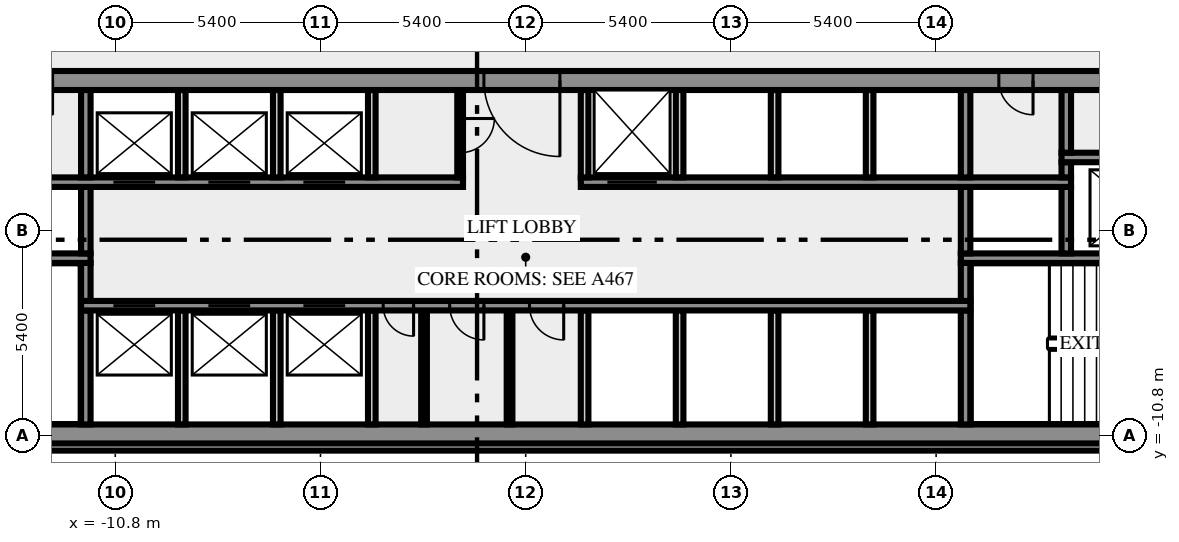
"""IFC4 building model, lengths in metres.
Left out: names, types, materials, properties, quantities, classifications, styles, units other than length and angle.
Written with IfcOpenShell. Run it as: python <this file> out.ifc"""

import sys

from ifc_helpers import new_model, si_unit, direction, frame, frame_2d, origin, place, context, subcontext, project, spatial, rectangle, extrude, element, fill, save


model = new_model("IFC4")
c1 = context("Model", 3, precision=1e-05, world=origin(), true_north=direction((0.0, 1.0)))
c2 = subcontext(c1, "Body", "Model", "MODEL_VIEW")
j1 = project(units=[si_unit("LENGTHUNIT", "METRE"), si_unit("PLANEANGLEUNIT", "RADIAN")], contexts=[c1])
p1 = place(None, origin())
s1 = spatial("IfcSite", under=j1, at=p1, CompositionType="ELEMENT")
p2 = place(p1, origin())
s2 = spatial("IfcBuilding", under=s1, at=p2, CompositionType="ELEMENT")
p3 = place(p2, frame((0.0, 0.0, 97.0)))
s3 = spatial("IfcBuildingStorey", under=s2, at=p3, CompositionType="ELEMENT", Elevation=97.0)
p4 = place(p3, frame((-17.444, -11.088, 0.0), z_axis=(0.0, 0.0, 1.0), x_axis=(1.0, 0.0, 0.0)))
e1 = element("IfcWall", 1, at=p4, inside=s3, PredefinedType="SOLIDWALL", context=c2, shape_type="SweptSolid", body=[
    extrude(rectangle(XDim=34.888, YDim=0.2, at=frame_2d((17.444, 0.0))), origin(), (0.0, 0.0, 1.0), 3.65),
])
p5 = place(p3, frame((-20.0, -10.75, 0.0), z_axis=(0.0, 0.0, 1.0), x_axis=(1.0, 0.0, 0.0)))
e2 = element("IfcWall", 2, at=p5, inside=s3, PredefinedType="SHEAR", context=c2, shape_type="SweptSolid", body=[
    extrude(rectangle(XDim=40.0, YDim=0.5, at=frame_2d((20.0, 0.0))), origin(), (0.0, 0.0, 1.0), 3.65),
])
p6 = place(p5, frame((0.8, 0.0, 1.0)))
e3 = element("IfcOpeningElement", 3, at=p6, cuts=e2, PredefinedType="OPENING", context=c2, shape_type="SweptSolid", body=[
    extrude(rectangle(XDim=1.2, YDim=1.2, at=frame_2d((0.6, 0.6))), frame((0.0, 0.26, 0.0), z_axis=(0.0, -1.0, 0.0), x_axis=(1.0, 0.0, 0.0)), (0.0, 0.0, 1.0), 0.52),
])
p7 = place(p5, frame((38.0, 0.0, 1.0)))
e4 = element("IfcOpeningElement", 4, at=p7, cuts=e2, PredefinedType="OPENING", context=c2, shape_type="SweptSolid", body=[
    extrude(rectangle(XDim=1.2, YDim=1.2, at=frame_2d((0.6, 0.6))), frame((0.0, 0.26, 0.0), z_axis=(0.0, -1.0, 0.0), x_axis=(1.0, 0.0, 0.0)), (0.0, 0.0, 1.0), 0.52),
])
p8 = place(p3, frame((-11.575, -10.5, 0.0), z_axis=(0.0, 0.0, 1.0), x_axis=(0.0, 1.0, 0.0)))
e5 = element("IfcWall", 5, at=p8, inside=s3, PredefinedType="SHEAR", context=c2, shape_type="SweptSolid", body=[
    extrude(rectangle(XDim=3.0, YDim=0.25, at=frame_2d((1.5, 0.0))), origin(), (0.0, 0.0, 1.0), 3.65),
])
for number, where, z_axis, x_axis in (
    (6, (-9.05, -10.5, 0.0), (0.0, 0.0, 1.0), (0.0, 1.0, 0.0)),
    (7, (-6.55, -10.5, 0.0), (0.0, 0.0, 1.0), (0.0, 1.0, 0.0)),
    (8, (-4.05, -10.5, 0.0), (0.0, 0.0, 1.0), (0.0, 1.0, 0.0)),
):
    element("IfcWall", number, at=place(p3, frame(where, z_axis=z_axis, x_axis=x_axis)), inside=s3, PredefinedType="SOLIDWALL", context=c2, shape_type="SweptSolid", body=[
        extrude(rectangle(XDim=3.0, YDim=0.2, at=frame_2d((1.5, 0.0))), origin(), (0.0, 0.0, 1.0), 3.65),
    ])
for number, where, z_axis, x_axis in (
    (9, (-2.675, -10.5, 0.0), (0.0, 0.0, 1.0), (0.0, 1.0, 0.0)),
    (10, (-0.425, -10.5, 0.0), (0.0, 0.0, 1.0), (0.0, 1.0, 0.0)),
):
    element("IfcWall", number, at=place(p3, frame(where, z_axis=z_axis, x_axis=x_axis)), inside=s3, PredefinedType="PARTITIONING", context=c2, shape_type="SweptSolid", body=[
        extrude(rectangle(XDim=3.0, YDim=0.15, at=frame_2d((1.5, 0.0))), origin(), (0.0, 0.0, 1.0), 3.65),
    ])
for number, where, z_axis, x_axis in (
    (11, (1.55, -10.5, 0.0), (0.0, 0.0, 1.0), (0.0, 1.0, 0.0)),
    (12, (4.05, -10.5, 0.0), (0.0, 0.0, 1.0), (0.0, 1.0, 0.0)),
    (13, (6.55, -10.5, 0.0), (0.0, 0.0, 1.0), (0.0, 1.0, 0.0)),
    (14, (9.05, -10.5, 0.0), (0.0, 0.0, 1.0), (0.0, 1.0, 0.0)),
):
    element("IfcWall", number, at=place(p3, frame(where, z_axis=z_axis, x_axis=x_axis)), inside=s3, PredefinedType="SOLIDWALL", context=c2, shape_type="SweptSolid", body=[
        extrude(rectangle(XDim=3.0, YDim=0.2, at=frame_2d((1.5, 0.0))), origin(), (0.0, 0.0, 1.0), 3.65),
    ])
p9 = place(p3, frame((11.575, -10.5, 0.0), z_axis=(0.0, 0.0, 1.0), x_axis=(0.0, 1.0, 0.0)))
e15 = element("IfcWall", 15, at=p9, inside=s3, PredefinedType="SHEAR", context=c2, shape_type="SweptSolid", body=[
    extrude(rectangle(XDim=3.0, YDim=0.25, at=frame_2d((1.5, 0.0))), origin(), (0.0, 0.0, 1.0), 3.65),
])
p10 = place(p3, frame((11.7, -7.375, 0.0), z_axis=(0.0, 0.0, 1.0), x_axis=(-1.0, 0.0, 0.0)))
e16 = element("IfcWall", 16, at=p10, inside=s3, PredefinedType="SHEAR", context=c2, shape_type="SweptSolid", body=[
    extrude(rectangle(XDim=23.4, YDim=0.25, at=frame_2d((11.7, 0.0))), origin(), (0.0, 0.0, 1.0), 3.65),
])
p11 = place(p10, frame((21.45, 0.0, 0.0)))
e17 = element("IfcOpeningElement", 17, at=p11, cuts=e16, PredefinedType="OPENING", context=c2, shape_type="SweptSolid", body=[
    extrude(rectangle(XDim=1.1, YDim=2.1, at=frame_2d((0.55, 1.05))), frame((0.0, 0.135, 0.0), z_axis=(0.0, -1.0, 0.0), x_axis=(1.0, 0.0, 0.0)), (0.0, 0.0, 1.0), 0.27),
])
p12 = place(p10, frame((18.95, 0.0, 0.0)))
e18 = element("IfcOpeningElement", 18, at=p12, cuts=e16, PredefinedType="OPENING", context=c2, shape_type="SweptSolid", body=[
    extrude(rectangle(XDim=1.1, YDim=2.1, at=frame_2d((0.55, 1.05))), frame((0.0, 0.135, 0.0), z_axis=(0.0, -1.0, 0.0), x_axis=(1.0, 0.0, 0.0)), (0.0, 0.0, 1.0), 0.27),
])
p13 = place(p10, frame((16.45, 0.0, 0.0)))
e19 = element("IfcOpeningElement", 19, at=p13, cuts=e16, PredefinedType="OPENING", context=c2, shape_type="SweptSolid", body=[
    extrude(rectangle(XDim=1.1, YDim=2.1, at=frame_2d((0.55, 1.05))), frame((0.0, 0.135, 0.0), z_axis=(0.0, -1.0, 0.0), x_axis=(1.0, 0.0, 0.0)), (0.0, 0.0, 1.0), 0.27),
])
p14 = place(p10, frame((14.65, 0.0, 0.0)))
e20 = element("IfcOpeningElement", 20, at=p14, cuts=e16, PredefinedType="OPENING", context=c2, shape_type="SweptSolid", body=[
    extrude(rectangle(XDim=0.8, YDim=2.1, at=frame_2d((0.4, 1.05))), frame((0.0, 0.135, 0.0), z_axis=(0.0, -1.0, 0.0), x_axis=(1.0, 0.0, 0.0)), (0.0, 0.0, 1.0), 0.27),
])
p15 = place(p10, frame((12.8, 0.0, 0.0)))
e21 = element("IfcOpeningElement", 21, at=p15, cuts=e16, PredefinedType="OPENING", context=c2, shape_type="SweptSolid", body=[
    extrude(rectangle(XDim=0.9, YDim=2.1, at=frame_2d((0.45, 1.05))), frame((0.0, 0.135, 0.0), z_axis=(0.0, -1.0, 0.0), x_axis=(1.0, 0.0, 0.0)), (0.0, 0.0, 1.0), 0.27),
])
p16 = place(p10, frame((10.7, 0.0, 0.0)))
e22 = element("IfcOpeningElement", 22, at=p16, cuts=e16, PredefinedType="OPENING", context=c2, shape_type="SweptSolid", body=[
    extrude(rectangle(XDim=0.9, YDim=2.1, at=frame_2d((0.45, 1.05))), frame((0.0, 0.135, 0.0), z_axis=(0.0, -1.0, 0.0), x_axis=(1.0, 0.0, 0.0)), (0.0, 0.0, 1.0), 0.27),
])
for number, where, z_axis, x_axis in (
    (23, (-11.575, -7.25, 0.0), (0.0, 0.0, 1.0), (0.0, 1.0, 0.0)),
    (24, (11.575, -7.25, 0.0), (0.0, 0.0, 1.0), (0.0, 1.0, 0.0)),
):
    element("IfcWall", number, at=place(p3, frame(where, z_axis=z_axis, x_axis=x_axis)), inside=s3, PredefinedType="SHEAR", context=c2, shape_type="SweptSolid", body=[
        extrude(rectangle(XDim=1.0, YDim=0.25, at=frame_2d((0.5, 0.0))), origin(), (0.0, 0.0, 1.0), 3.65),
    ])
p17 = place(p3, frame((-11.45, -6.125, 0.0), z_axis=(0.0, 0.0, 1.0), x_axis=(-1.0, 0.0, 0.0)))
e25 = element("IfcWall", 25, at=p17, inside=s3, PredefinedType="SHEAR", context=c2, shape_type="SweptSolid", body=[
    extrude(rectangle(XDim=8.05, YDim=0.25, at=frame_2d((4.025, 0.0))), origin(), (0.0, 0.0, 1.0), 3.65),
])
p18 = place(p17, frame((6.2, 0.0, 0.0)))
e26 = element("IfcOpeningElement", 26, at=p18, cuts=e25, PredefinedType="OPENING", context=c2, shape_type="SweptSolid", body=[
    extrude(rectangle(XDim=1.8, YDim=2.1, at=frame_2d((0.9, 1.05))), frame((0.0, 0.135, 0.0), z_axis=(0.0, -1.0, 0.0), x_axis=(1.0, 0.0, 0.0)), (0.0, 0.0, 1.0), 0.27),
])
p19 = place(p3, frame((19.5, -6.125, 0.0), z_axis=(0.0, 0.0, 1.0), x_axis=(-1.0, 0.0, 0.0)))
e27 = element("IfcWall", 27, at=p19, inside=s3, PredefinedType="SHEAR", context=c2, shape_type="SweptSolid", body=[
    extrude(rectangle(XDim=8.05, YDim=0.25, at=frame_2d((4.025, 0.0))), origin(), (0.0, 0.0, 1.0), 3.65),
])
p20 = place(p19, frame((0.05, 0.0, 0.0)))
e28 = element("IfcOpeningElement", 28, at=p20, cuts=e27, PredefinedType="OPENING", context=c2, shape_type="SweptSolid", body=[
    extrude(rectangle(XDim=1.8, YDim=2.1, at=frame_2d((0.9, 1.05))), frame((0.0, 0.135, 0.0), z_axis=(0.0, -1.0, 0.0), x_axis=(1.0, 0.0, 0.0)), (0.0, 0.0, 1.0), 0.27),
])
for number, where, z_axis, x_axis in (
    (29, (-11.575, -6.0, 0.0), (0.0, 0.0, 1.0), (0.0, 1.0, 0.0)),
    (30, (11.575, -6.0, 0.0), (0.0, 0.0, 1.0), (0.0, 1.0, 0.0)),
    (31, (14.225, -6.0, 0.0), (0.0, 0.0, 1.0), (0.0, 1.0, 0.0)),
):
    element("IfcWall", number, at=place(p3, frame(where, z_axis=z_axis, x_axis=x_axis)), inside=s3, PredefinedType="SHEAR", context=c2, shape_type="SweptSolid", body=[
        extrude(rectangle(XDim=1.75, YDim=0.25, at=frame_2d((0.875, 0.0))), origin(), (0.0, 0.0, 1.0), 3.65),
    ])
p21 = place(p3, frame((-14.35, -4.125, 0.0), z_axis=(0.0, 0.0, 1.0), x_axis=(1.0, 0.0, 0.0)))
e32 = element("IfcWall", 32, at=p21, inside=s3, PredefinedType="SHEAR", context=c2, shape_type="SweptSolid", body=[
    extrude(rectangle(XDim=12.7, YDim=0.25, at=frame_2d((6.35, 0.0))), origin(), (0.0, 0.0, 1.0), 3.65),
])
p22 = place(p21, frame((3.5, 0.0, 0.0)))
e33 = element("IfcOpeningElement", 33, at=p22, cuts=e32, PredefinedType="OPENING", context=c2, shape_type="SweptSolid", body=[
    extrude(rectangle(XDim=1.1, YDim=2.1, at=frame_2d((0.55, 1.05))), frame((0.0, 0.135, 0.0), z_axis=(0.0, -1.0, 0.0), x_axis=(1.0, 0.0, 0.0)), (0.0, 0.0, 1.0), 0.27),
])
p23 = place(p21, frame((6.0, 0.0, 0.0)))
e34 = element("IfcOpeningElement", 34, at=p23, cuts=e32, PredefinedType="OPENING", context=c2, shape_type="SweptSolid", body=[
    extrude(rectangle(XDim=1.1, YDim=2.1, at=frame_2d((0.55, 1.05))), frame((0.0, 0.135, 0.0), z_axis=(0.0, -1.0, 0.0), x_axis=(1.0, 0.0, 0.0)), (0.0, 0.0, 1.0), 0.27),
])
p24 = place(p21, frame((8.5, 0.0, 0.0)))
e35 = element("IfcOpeningElement", 35, at=p24, cuts=e32, PredefinedType="OPENING", context=c2, shape_type="SweptSolid", body=[
    extrude(rectangle(XDim=1.1, YDim=2.1, at=frame_2d((0.55, 1.05))), frame((0.0, 0.135, 0.0), z_axis=(0.0, -1.0, 0.0), x_axis=(1.0, 0.0, 0.0)), (0.0, 0.0, 1.0), 0.27),
])
p25 = place(p3, frame((1.45, -4.125, 0.0), z_axis=(0.0, 0.0, 1.0), x_axis=(1.0, 0.0, 0.0)))
e36 = element("IfcWall", 36, at=p25, inside=s3, PredefinedType="SHEAR", context=c2, shape_type="SweptSolid", body=[
    extrude(rectangle(XDim=12.9, YDim=0.25, at=frame_2d((6.45, 0.0))), origin(), (0.0, 0.0, 1.0), 3.65),
])
p26 = place(p25, frame((0.7, 0.0, 0.0)))
e37 = element("IfcOpeningElement", 37, at=p26, cuts=e36, PredefinedType="OPENING", context=c2, shape_type="SweptSolid", body=[
    extrude(rectangle(XDim=1.3, YDim=2.1, at=frame_2d((0.65, 1.05))), frame((0.0, 0.135, 0.0), z_axis=(0.0, -1.0, 0.0), x_axis=(1.0, 0.0, 0.0)), (0.0, 0.0, 1.0), 0.27),
])
p27 = place(p3, frame((-11.575, -4.0, 0.0), z_axis=(0.0, 0.0, 1.0), x_axis=(0.0, 1.0, 0.0)))
e38 = element("IfcWall", 38, at=p27, inside=s3, PredefinedType="SHEAR", context=c2, shape_type="SweptSolid", body=[
    extrude(rectangle(XDim=2.3, YDim=0.25, at=frame_2d((1.15, 0.0))), origin(), (0.0, 0.0, 1.0), 3.65),
])
for number, where, z_axis, x_axis in (
    (39, (-9.05, -4.0, 0.0), (0.0, 0.0, 1.0), (0.0, 1.0, 0.0)),
    (40, (-6.55, -4.0, 0.0), (0.0, 0.0, 1.0), (0.0, 1.0, 0.0)),
    (41, (-4.05, -4.0, 0.0), (0.0, 0.0, 1.0), (0.0, 1.0, 0.0)),
):
    element("IfcWall", number, at=place(p3, frame(where, z_axis=z_axis, x_axis=x_axis)), inside=s3, PredefinedType="SOLIDWALL", context=c2, shape_type="SweptSolid", body=[
        extrude(rectangle(XDim=2.3, YDim=0.2, at=frame_2d((1.15, 0.0))), origin(), (0.0, 0.0, 1.0), 3.65),
    ])
p28 = place(p3, frame((-1.725, -1.7, 0.0), z_axis=(0.0, 0.0, 1.0), x_axis=(0.0, -1.0, 0.0)))
e42 = element("IfcWall", 42, at=p28, inside=s3, PredefinedType="PARTITIONING", context=c2, shape_type="SweptSolid", body=[
    extrude(rectangle(XDim=2.3, YDim=0.15, at=frame_2d((1.15, 0.0))), origin(), (0.0, 0.0, 1.0), 3.65),
])
p29 = place(p28, frame((0.75, 0.0, 0.0)))
e43 = element("IfcOpeningElement", 43, at=p29, cuts=e42, PredefinedType="OPENING", context=c2, shape_type="SweptSolid", body=[
    extrude(rectangle(XDim=0.9, YDim=2.1, at=frame_2d((0.45, 1.05))), frame((0.0, 0.085, 0.0), z_axis=(0.0, -1.0, 0.0), x_axis=(1.0, 0.0, 0.0)), (0.0, 0.0, 1.0), 0.17),
])
for number, where, z_axis, x_axis in (
    (44, (1.55, -4.0, 0.0), (0.0, 0.0, 1.0), (0.0, 1.0, 0.0)),
    (45, (4.05, -4.0, 0.0), (0.0, 0.0, 1.0), (0.0, 1.0, 0.0)),
    (46, (6.55, -4.0, 0.0), (0.0, 0.0, 1.0), (0.0, 1.0, 0.0)),
    (47, (9.05, -4.0, 0.0), (0.0, 0.0, 1.0), (0.0, 1.0, 0.0)),
):
    element("IfcWall", number, at=place(p3, frame(where, z_axis=z_axis, x_axis=x_axis)), inside=s3, PredefinedType="SOLIDWALL", context=c2, shape_type="SweptSolid", body=[
        extrude(rectangle(XDim=2.3, YDim=0.2, at=frame_2d((1.15, 0.0))), origin(), (0.0, 0.0, 1.0), 3.65),
    ])
p30 = place(p3, frame((11.575, -4.0, 0.0), z_axis=(0.0, 0.0, 1.0), x_axis=(0.0, 1.0, 0.0)))
e48 = element("IfcWall", 48, at=p30, inside=s3, PredefinedType="SHEAR", context=c2, shape_type="SweptSolid", body=[
    extrude(rectangle(XDim=2.3, YDim=0.25, at=frame_2d((1.15, 0.0))), origin(), (0.0, 0.0, 1.0), 3.65),
])
p31 = place(p3, frame((14.225, -4.0, 0.0), z_axis=(0.0, 0.0, 1.0), x_axis=(0.0, 1.0, 0.0)))
e49 = element("IfcWall", 49, at=p31, inside=s3, PredefinedType="SHEAR", context=c2, shape_type="SweptSolid", body=[
    extrude(rectangle(XDim=0.4, YDim=0.25, at=frame_2d((0.2, 0.0))), origin(), (0.0, 0.0, 1.0), 3.65),
])
p32 = place(p3, frame((14.1, -3.475, 0.0), z_axis=(0.0, 0.0, 1.0), x_axis=(1.0, 0.0, 0.0)))
e50 = element("IfcWall", 50, at=p32, inside=s3, PredefinedType="SHEAR", context=c2, shape_type="SweptSolid", body=[
    extrude(rectangle(XDim=3.25, YDim=0.25, at=frame_2d((1.625, 0.0))), origin(), (0.0, 0.0, 1.0), 3.65),
])
p33 = place(p3, frame((14.225, -3.35, 0.0), z_axis=(0.0, 0.0, 1.0), x_axis=(0.0, 1.0, 0.0)))
e51 = element("IfcWall", 51, at=p33, inside=s3, PredefinedType="SHEAR", context=c2, shape_type="SweptSolid", body=[
    extrude(rectangle(XDim=1.65, YDim=0.25, at=frame_2d((0.825, 0.0))), origin(), (0.0, 0.0, 1.0), 3.65),
])
p34 = place(p3, frame((20.49, -1.45, 0.0), z_axis=(0.0, 0.0, 1.0), x_axis=(-1.0, 0.0, 0.0)))
e52 = element("IfcWall", 52, at=p34, inside=s3, PredefinedType="SHEAR", context=c2, shape_type="SweptSolid", body=[
    extrude(rectangle(XDim=40.98, YDim=0.5, at=frame_2d((20.49, 0.0))), origin(), (0.0, 0.0, 1.0), 3.65),
])
p35 = place(p34, frame((38.14, 0.0, 0.0)))
e53 = element("IfcOpeningElement", 53, at=p35, cuts=e52, PredefinedType="OPENING", context=c2, shape_type="SweptSolid", body=[
    extrude(rectangle(XDim=1.8, YDim=2.1, at=frame_2d((0.9, 1.05))), frame((0.0, 0.26, 0.0), z_axis=(0.0, -1.0, 0.0), x_axis=(1.0, 0.0, 0.0)), (0.0, 0.0, 1.0), 0.52),
])
p36 = place(p34, frame((36.728, 0.0, 0.0)))
e54 = element("IfcOpeningElement", 54, at=p36, cuts=e52, PredefinedType="OPENING", context=c2, shape_type="SweptSolid", body=[
    extrude(rectangle(XDim=0.8, YDim=2.1, at=frame_2d((0.4, 1.05))), frame((0.0, 0.26, 0.0), z_axis=(0.0, -1.0, 0.0), x_axis=(1.0, 0.0, 0.0)), (0.0, 0.0, 1.0), 0.52),
])
p37 = place(p34, frame((35.153, 0.0, 0.0)))
e55 = element("IfcOpeningElement", 55, at=p37, cuts=e52, PredefinedType="OPENING", context=c2, shape_type="SweptSolid", body=[
    extrude(rectangle(XDim=0.8, YDim=2.1, at=frame_2d((0.4, 1.05))), frame((0.0, 0.26, 0.0), z_axis=(0.0, -1.0, 0.0), x_axis=(1.0, 0.0, 0.0)), (0.0, 0.0, 1.0), 0.52),
])
p38 = place(p34, frame((32.94, 0.0, 0.0)))
e56 = element("IfcOpeningElement", 56, at=p38, cuts=e52, PredefinedType="OPENING", context=c2, shape_type="SweptSolid", body=[
    extrude(rectangle(XDim=0.9, YDim=2.1, at=frame_2d((0.45, 1.05))), frame((0.0, 0.26, 0.0), z_axis=(0.0, -1.0, 0.0), x_axis=(1.0, 0.0, 0.0)), (0.0, 0.0, 1.0), 0.52),
])
p39 = place(p34, frame((19.59, 0.0, 0.0)))
e57 = element("IfcOpeningElement", 57, at=p39, cuts=e52, PredefinedType="OPENING", context=c2, shape_type="SweptSolid", body=[
    extrude(rectangle(XDim=2.0, YDim=2.1, at=frame_2d((1.0, 1.05))), frame((0.0, 0.26, 0.0), z_axis=(0.0, -1.0, 0.0), x_axis=(1.0, 0.0, 0.0)), (0.0, 0.0, 1.0), 0.52),
])
p40 = place(p34, frame((7.14, 0.0, 0.0)))
e58 = element("IfcOpeningElement", 58, at=p40, cuts=e52, PredefinedType="OPENING", context=c2, shape_type="SweptSolid", body=[
    extrude(rectangle(XDim=0.9, YDim=2.1, at=frame_2d((0.45, 1.05))), frame((0.0, 0.26, 0.0), z_axis=(0.0, -1.0, 0.0), x_axis=(1.0, 0.0, 0.0)), (0.0, 0.0, 1.0), 0.52),
])
p41 = place(p34, frame((4.19, 0.0, 0.0)))
e59 = element("IfcOpeningElement", 59, at=p41, cuts=e52, PredefinedType="OPENING", context=c2, shape_type="SweptSolid", body=[
    extrude(rectangle(XDim=0.9, YDim=2.1, at=frame_2d((0.45, 1.05))), frame((0.0, 0.26, 0.0), z_axis=(0.0, -1.0, 0.0), x_axis=(1.0, 0.0, 0.0)), (0.0, 0.0, 1.0), 0.52),
])
p42 = place(p34, frame((1.04, 0.0, 0.0)))
e60 = element("IfcOpeningElement", 60, at=p42, cuts=e52, PredefinedType="OPENING", context=c2, shape_type="SweptSolid", body=[
    extrude(rectangle(XDim=1.8, YDim=2.1, at=frame_2d((0.9, 1.05))), frame((0.0, 0.26, 0.0), z_axis=(0.0, -1.0, 0.0), x_axis=(1.0, 0.0, 0.0)), (0.0, 0.0, 1.0), 0.52),
])
p43 = place(p11, origin())
e61 = element("IfcDoor", 61, at=p43, inside=s3, OperationType="DOUBLE_DOOR_SLIDING", PredefinedType="DOOR", context=c2, shape_type="SweptSolid", body=[
    extrude(rectangle(XDim=1.1, YDim=2.1, at=frame_2d((0.55, 1.05))), frame((0.0, 0.025, 0.0), z_axis=(0.0, -1.0, 0.0), x_axis=(1.0, 0.0, 0.0)), (0.0, 0.0, 1.0), 0.05),
])
fill(e17, e61)
p44 = place(p12, origin())
e62 = element("IfcDoor", 62, at=p44, inside=s3, OperationType="DOUBLE_DOOR_SLIDING", PredefinedType="DOOR", context=c2, shape_type="SweptSolid", body=[
    extrude(rectangle(XDim=1.1, YDim=2.1, at=frame_2d((0.55, 1.05))), frame((0.0, 0.025, 0.0), z_axis=(0.0, -1.0, 0.0), x_axis=(1.0, 0.0, 0.0)), (0.0, 0.0, 1.0), 0.05),
])
fill(e18, e62)
p45 = place(p13, origin())
e63 = element("IfcDoor", 63, at=p45, inside=s3, OperationType="DOUBLE_DOOR_SLIDING", PredefinedType="DOOR", context=c2, shape_type="SweptSolid", body=[
    extrude(rectangle(XDim=1.1, YDim=2.1, at=frame_2d((0.55, 1.05))), frame((0.0, 0.025, 0.0), z_axis=(0.0, -1.0, 0.0), x_axis=(1.0, 0.0, 0.0)), (0.0, 0.0, 1.0), 0.05),
])
fill(e19, e63)
p46 = place(p14, origin())
e64 = element("IfcDoor", 64, at=p46, inside=s3, OperationType="SINGLE_SWING_RIGHT", PredefinedType="DOOR", context=c2, shape_type="SweptSolid", body=[
    extrude(rectangle(XDim=0.8, YDim=2.1, at=frame_2d((0.4, 1.05))), frame((0.0, 0.025, 0.0), z_axis=(0.0, -1.0, 0.0), x_axis=(1.0, 0.0, 0.0)), (0.0, 0.0, 1.0), 0.05),
])
fill(e20, e64)
p47 = place(p15, origin())
e65 = element("IfcDoor", 65, at=p47, inside=s3, OperationType="SINGLE_SWING_RIGHT", PredefinedType="DOOR", context=c2, shape_type="SweptSolid", body=[
    extrude(rectangle(XDim=0.9, YDim=2.1, at=frame_2d((0.45, 1.05))), frame((0.0, 0.025, 0.0), z_axis=(0.0, -1.0, 0.0), x_axis=(1.0, 0.0, 0.0)), (0.0, 0.0, 1.0), 0.05),
])
fill(e21, e65)
p48 = place(p16, origin())
e66 = element("IfcDoor", 66, at=p48, inside=s3, OperationType="SINGLE_SWING_LEFT", PredefinedType="DOOR", context=c2, shape_type="SweptSolid", body=[
    extrude(rectangle(XDim=0.9, YDim=2.1, at=frame_2d((0.45, 1.05))), frame((0.0, 0.025, 0.0), z_axis=(0.0, -1.0, 0.0), x_axis=(1.0, 0.0, 0.0)), (0.0, 0.0, 1.0), 0.05),
])
fill(e22, e66)
p49 = place(p22, origin())
e67 = element("IfcDoor", 67, at=p49, inside=s3, OperationType="DOUBLE_DOOR_SLIDING", PredefinedType="DOOR", context=c2, shape_type="SweptSolid", body=[
    extrude(rectangle(XDim=1.1, YDim=2.1, at=frame_2d((0.55, 1.05))), frame((0.0, 0.025, 0.0), z_axis=(0.0, -1.0, 0.0), x_axis=(1.0, 0.0, 0.0)), (0.0, 0.0, 1.0), 0.05),
])
fill(e33, e67)
p50 = place(p23, origin())
e68 = element("IfcDoor", 68, at=p50, inside=s3, OperationType="DOUBLE_DOOR_SLIDING", PredefinedType="DOOR", context=c2, shape_type="SweptSolid", body=[
    extrude(rectangle(XDim=1.1, YDim=2.1, at=frame_2d((0.55, 1.05))), frame((0.0, 0.025, 0.0), z_axis=(0.0, -1.0, 0.0), x_axis=(1.0, 0.0, 0.0)), (0.0, 0.0, 1.0), 0.05),
])
fill(e34, e68)
p51 = place(p24, origin())
e69 = element("IfcDoor", 69, at=p51, inside=s3, OperationType="DOUBLE_DOOR_SLIDING", PredefinedType="DOOR", context=c2, shape_type="SweptSolid", body=[
    extrude(rectangle(XDim=1.1, YDim=2.1, at=frame_2d((0.55, 1.05))), frame((0.0, 0.025, 0.0), z_axis=(0.0, -1.0, 0.0), x_axis=(1.0, 0.0, 0.0)), (0.0, 0.0, 1.0), 0.05),
])
fill(e35, e69)
p52 = place(p26, origin())
e70 = element("IfcDoor", 70, at=p52, inside=s3, OperationType="DOUBLE_DOOR_SLIDING", PredefinedType="DOOR", context=c2, shape_type="SweptSolid", body=[
    extrude(rectangle(XDim=1.3, YDim=2.1, at=frame_2d((0.65, 1.05))), frame((0.0, 0.025, 0.0), z_axis=(0.0, -1.0, 0.0), x_axis=(1.0, 0.0, 0.0)), (0.0, 0.0, 1.0), 0.05),
])
fill(e37, e70)
p53 = place(p29, origin())
e71 = element("IfcDoor", 71, at=p53, inside=s3, OperationType="SINGLE_SWING_RIGHT", PredefinedType="DOOR", context=c2, shape_type="SweptSolid", body=[
    extrude(rectangle(XDim=0.9, YDim=2.1, at=frame_2d((0.45, 1.05))), frame((0.0, 0.025, 0.0), z_axis=(0.0, -1.0, 0.0), x_axis=(1.0, 0.0, 0.0)), (0.0, 0.0, 1.0), 0.05),
])
fill(e43, e71)
p54 = place(p39, origin())
e72 = element("IfcDoor", 72, at=p54, inside=s3, OperationType="DOUBLE_DOOR_SINGLE_SWING", PredefinedType="DOOR", context=c2, shape_type="SweptSolid", body=[
    extrude(rectangle(XDim=2.0, YDim=2.1, at=frame_2d((1.0, 1.05))), frame((0.0, 0.025, 0.0), z_axis=(0.0, -1.0, 0.0), x_axis=(1.0, 0.0, 0.0)), (0.0, 0.0, 1.0), 0.05),
])
fill(e57, e72)
p55 = place(p40, origin())
e73 = element("IfcDoor", 73, at=p55, inside=s3, OperationType="SINGLE_SWING_LEFT", PredefinedType="DOOR", context=c2, shape_type="SweptSolid", body=[
    extrude(rectangle(XDim=0.9, YDim=2.1, at=frame_2d((0.45, 1.05))), frame((0.0, 0.025, 0.0), z_axis=(0.0, -1.0, 0.0), x_axis=(1.0, 0.0, 0.0)), (0.0, 0.0, 1.0), 0.05),
])
fill(e58, e73)
save(model, sys.argv[1])
